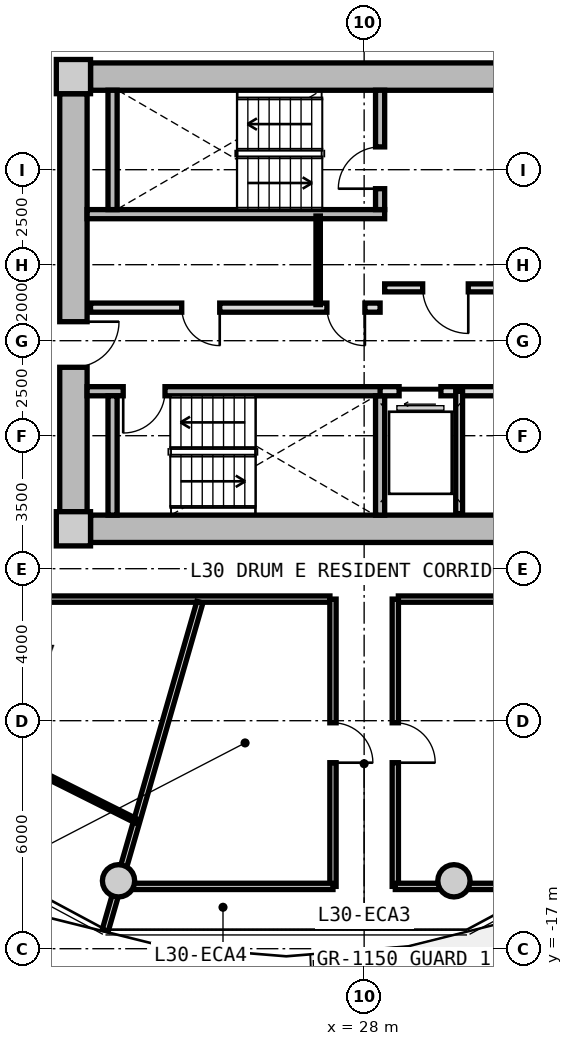
"""IFC4 building model, lengths in metres.
Left out: names, types, materials, properties, quantities, classifications, styles, units other than length and angle.
Written with IfcOpenShell. Run it as: python <this file> out.ifc"""

import sys

from ifc_helpers import new_model, si_unit, direction, frame, frame_2d, origin, origin_2d, place, context, subcontext, project, spatial, rectangle, circle, extrude, source, transform, mapped, element, fill, save


model = new_model("IFC4")
c1 = context("Model", 3, precision=1e-05, world=origin(), true_north=direction((0.0, 1.0)))
c2 = subcontext(c1, "Body", "Model", "MODEL_VIEW")
j1 = project(units=[si_unit("LENGTHUNIT", "METRE"), si_unit("PLANEANGLEUNIT", "RADIAN")], contexts=[c1])
p1 = place(None, origin())
s1 = spatial("IfcSite", under=j1, at=p1, CompositionType="ELEMENT")
p2 = place(p1, origin())
s2 = spatial("IfcBuilding", under=s1, at=p2, CompositionType="ELEMENT")
p3 = place(p2, frame((0.0, 0.0, 99.3)))
s3 = spatial("IfcBuildingStorey", under=s2, at=p3, CompositionType="ELEMENT", Elevation=99.3)
m1 = source(origin(), c2, "Body", "SweptSolid", [
    extrude(rectangle(XDim=0.9, YDim=0.9, at=origin_2d()), origin(), (0.0, 0.0, 1.0), 3.05),
])
for number, where, z_axis, x_axis in (
    (1, (20.35, -5.95, 0.0), (0.0, 0.0, 1.0), (1.0, 0.0, 0.0)),
    (2, (20.35, 5.95, 0.0), (0.0, 0.0, 1.0), (1.0, 0.0, 0.0)),
):
    element("IfcColumn", number, at=place(p3, frame(where, z_axis=z_axis, x_axis=x_axis)), inside=s3, PredefinedType="COLUMN", context=c2, shape_type="MappedRepresentation", body=[
        mapped(m1, transform((0.0, 0.0, 0.0), x_axis=(1.0, 0.0, 0.0), y_axis=(0.0, 1.0, 0.0), z_axis=(0.0, 0.0, 1.0), scale=1.0)),
    ])
m2 = source(origin(), c2, "Body", "SweptSolid", [
    extrude(rectangle(XDim=14.4, YDim=0.72, at=frame_2d((7.2, 0.0))), origin(), (0.0, 0.0, 1.0), 2.79),
])
for number, where, z_axis, x_axis in (
    (3, (20.8, 5.95, 0.0), (0.0, 0.0, 1.0), (1.0, 0.0, 0.0)),
    (4, (35.2, -5.95, 0.0), (0.0, 0.0, 1.0), (-1.0, 0.0, 0.0)),
):
    element("IfcWall", number, at=place(p3, frame(where, z_axis=z_axis, x_axis=x_axis)), inside=s3, PredefinedType="SHEAR", context=c2, shape_type="MappedRepresentation", body=[
        mapped(m2, transform((0.0, 0.0, 0.0), x_axis=(1.0, 0.0, 0.0), y_axis=(0.0, 1.0, 0.0), z_axis=(0.0, 0.0, 1.0), scale=1.0)),
    ])
m3 = source(origin(), c2, "Body", "SweptSolid", [
    extrude(rectangle(XDim=11.0, YDim=0.72, at=frame_2d((5.5, 0.0))), origin(), (0.0, 0.0, 1.0), 2.79),
])
p4 = place(p3, frame((20.35, -5.5, 0.0), z_axis=(0.0, 0.0, 1.0), x_axis=(0.0, 1.0, 0.0)))
e5 = element("IfcWall", 5, at=p4, inside=s3, PredefinedType="SHEAR", context=c2, shape_type="MappedRepresentation", body=[
    mapped(m3, transform((0.0, 0.0, 0.0), x_axis=(1.0, 0.0, 0.0), y_axis=(0.0, 1.0, 0.0), z_axis=(0.0, 0.0, 1.0), scale=1.0)),
])
p5 = place(p4, frame((3.8, 0.0, 0.0)))
e6 = element("IfcOpeningElement", 6, at=p5, cuts=e5, PredefinedType="OPENING", context=c2, shape_type="SweptSolid", body=[
    extrude(rectangle(XDim=1.2, YDim=2.15, at=frame_2d((0.6, 1.075))), frame((0.0, 0.37, 0.0), z_axis=(0.0, -1.0, 0.0), x_axis=(1.0, 0.0, 0.0)), (0.0, 0.0, 1.0), 0.74),
])
m4 = source(origin(), c2, "Body", "SweptSolid", [
    extrude(circle(Radius=0.425, at=origin_2d()), origin(), (0.0, 0.0, 1.0), 3.05),
])
for number, where, z_axis, x_axis in (
    (7, (21.537, -15.213, 0.0), (0.0, 0.0, 1.0), (1.0, 0.0, 0.0)),
    (8, (30.363, -15.213, 0.0), (0.0, 0.0, 1.0), (1.0, 0.0, 0.0)),
):
    element("IfcColumn", number, at=place(p3, frame(where, z_axis=z_axis, x_axis=x_axis)), inside=s3, PredefinedType="COLUMN", context=c2, shape_type="MappedRepresentation", body=[
        mapped(m4, transform((0.0, 0.0, 0.0), x_axis=(1.0, 0.0, 0.0), y_axis=(0.0, 1.0, 0.0), z_axis=(0.0, 0.0, 1.0), scale=1.0)),
    ])
m5 = source(origin(), c2, "Body", "SweptSolid", [
    extrude(rectangle(XDim=7.83, YDim=0.24, at=frame_2d((3.915, 0.0))), origin(), (0.0, 0.0, 1.0), 2.79),
])
p6 = place(p3, frame((20.71, 2.33, 0.0), z_axis=(0.0, 0.0, 1.0), x_axis=(1.0, 0.0, 0.0)))
e9 = element("IfcWall", 9, at=p6, inside=s3, PredefinedType="PARTITIONING", context=c2, shape_type="MappedRepresentation", body=[
    mapped(m5, transform((0.0, 0.0, 0.0), x_axis=(1.0, 0.0, 0.0), y_axis=(0.0, 1.0, 0.0), z_axis=(0.0, 0.0, 1.0), scale=1.0)),
])
m6 = source(origin(), c2, "Body", "SweptSolid", [
    extrude(rectangle(XDim=3.14, YDim=0.24, at=frame_2d((1.57, 0.0))), origin(), (0.0, 0.0, 1.0), 2.79),
])
p7 = place(p3, frame((21.38, 2.45, 0.0), z_axis=(0.0, 0.0, 1.0), x_axis=(0.0, 1.0, 0.0)))
e10 = element("IfcWall", 10, at=p7, inside=s3, PredefinedType="PARTITIONING", context=c2, shape_type="MappedRepresentation", body=[
    mapped(m6, transform((0.0, 0.0, 0.0), x_axis=(1.0, 0.0, 0.0), y_axis=(0.0, 1.0, 0.0), z_axis=(0.0, 0.0, 1.0), scale=1.0)),
])
p8 = place(p3, frame((28.42, 2.45, 0.0), z_axis=(0.0, 0.0, 1.0), x_axis=(0.0, 1.0, 0.0)))
e11 = element("IfcWall", 11, at=p8, inside=s3, PredefinedType="PARTITIONING", context=c2, shape_type="MappedRepresentation", body=[
    mapped(m6, transform((0.0, 0.0, 0.0), x_axis=(1.0, 0.0, 0.0), y_axis=(0.0, 1.0, 0.0), z_axis=(0.0, 0.0, 1.0), scale=1.0)),
])
p9 = place(p8, frame((0.55, 0.0, 0.0)))
e12 = element("IfcOpeningElement", 12, at=p9, cuts=e11, PredefinedType="OPENING", context=c2, shape_type="SweptSolid", body=[
    extrude(rectangle(XDim=1.1, YDim=2.15, at=frame_2d((0.55, 1.075))), frame((0.0, 0.13, 0.0), z_axis=(0.0, -1.0, 0.0), x_axis=(1.0, 0.0, 0.0)), (0.0, 0.0, 1.0), 0.26),
])
p10 = place(p3, frame((20.71, -2.33, 0.0), z_axis=(0.0, 0.0, 1.0), x_axis=(1.0, 0.0, 0.0)))
e13 = element("IfcWall", 13, at=p10, inside=s3, PredefinedType="PARTITIONING", context=c2, shape_type="MappedRepresentation", body=[
    mapped(m5, transform((0.0, 0.0, 0.0), x_axis=(1.0, 0.0, 0.0), y_axis=(0.0, 1.0, 0.0), z_axis=(0.0, 0.0, 1.0), scale=1.0)),
])
p11 = place(p10, frame((0.95, 0.0, 0.0)))
e14 = element("IfcOpeningElement", 14, at=p11, cuts=e13, PredefinedType="OPENING", context=c2, shape_type="SweptSolid", body=[
    extrude(rectangle(XDim=1.1, YDim=2.15, at=frame_2d((0.55, 1.075))), frame((0.0, 0.13, 0.0), z_axis=(0.0, -1.0, 0.0), x_axis=(1.0, 0.0, 0.0)), (0.0, 0.0, 1.0), 0.26),
])
for number, where, z_axis, x_axis in (
    (15, (21.38, -5.59, 0.0), (0.0, 0.0, 1.0), (0.0, 1.0, 0.0)),
    (16, (28.42, -5.59, 0.0), (0.0, 0.0, 1.0), (0.0, 1.0, 0.0)),
):
    element("IfcWall", number, at=place(p3, frame(where, z_axis=z_axis, x_axis=x_axis)), inside=s3, PredefinedType="PARTITIONING", context=c2, shape_type="MappedRepresentation", body=[
        mapped(m6, transform((0.0, 0.0, 0.0), x_axis=(1.0, 0.0, 0.0), y_axis=(0.0, 1.0, 0.0), z_axis=(0.0, 0.0, 1.0), scale=1.0)),
    ])
m7 = source(origin(), c2, "Body", "SweptSolid", [
    extrude(rectangle(XDim=6.66, YDim=0.21, at=frame_2d((3.33, 0.0))), origin(), (0.0, 0.0, 1.0), 2.775),
])
p12 = place(p3, frame((28.54, 0.39, 0.0), z_axis=(0.0, 0.0, 1.0), x_axis=(1.0, 0.0, 0.0)))
e17 = element("IfcWall", 17, at=p12, inside=s3, PredefinedType="PARTITIONING", context=c2, shape_type="MappedRepresentation", body=[
    mapped(m7, transform((0.0, 0.0, 0.0), x_axis=(1.0, 0.0, 0.0), y_axis=(0.0, 1.0, 0.0), z_axis=(0.0, 0.0, 1.0), scale=1.0)),
])
p13 = place(p12, frame((1.0, 0.0, 0.0)))
e18 = element("IfcOpeningElement", 18, at=p13, cuts=e17, PredefinedType="OPENING", context=c2, shape_type="SweptSolid", body=[
    extrude(rectangle(XDim=1.2, YDim=2.15, at=frame_2d((0.6, 1.075))), frame((0.0, 0.115, 0.0), z_axis=(0.0, -1.0, 0.0), x_axis=(1.0, 0.0, 0.0)), (0.0, 0.0, 1.0), 0.23),
])
m8 = source(origin(), c2, "Body", "SweptSolid", [
    extrude(rectangle(XDim=7.62, YDim=0.24, at=frame_2d((3.81, 0.0))), origin(), (0.0, 0.0, 1.0), 2.775),
])
p14 = place(p3, frame((20.8, -0.13, 0.0), z_axis=(0.0, 0.0, 1.0), x_axis=(1.0, 0.0, 0.0)))
e19 = element("IfcWall", 19, at=p14, inside=s3, PredefinedType="PARTITIONING", context=c2, shape_type="MappedRepresentation", body=[
    mapped(m8, transform((0.0, 0.0, 0.0), x_axis=(1.0, 0.0, 0.0), y_axis=(0.0, 1.0, 0.0), z_axis=(0.0, 0.0, 1.0), scale=1.0)),
])
p15 = place(p14, frame((6.22, 0.0, 0.0)))
e20 = element("IfcOpeningElement", 20, at=p15, cuts=e19, PredefinedType="OPENING", context=c2, shape_type="SweptSolid", body=[
    extrude(rectangle(XDim=1.0, YDim=2.1, at=frame_2d((0.5, 1.05))), frame((0.0, 0.13, 0.0), z_axis=(0.0, -1.0, 0.0), x_axis=(1.0, 0.0, 0.0)), (0.0, 0.0, 1.0), 0.26),
])
p16 = place(p14, frame((2.4, 0.0, 0.0)))
e21 = element("IfcOpeningElement", 21, at=p16, cuts=e19, PredefinedType="OPENING", context=c2, shape_type="SweptSolid", body=[
    extrude(rectangle(XDim=1.0, YDim=2.1, at=frame_2d((0.5, 1.05))), frame((0.0, 0.13, 0.0), z_axis=(0.0, -1.0, 0.0), x_axis=(1.0, 0.0, 0.0)), (0.0, 0.0, 1.0), 0.26),
])
m9 = source(origin(), c2, "Body", "SweptSolid", [
    extrude(rectangle(XDim=2.33, YDim=0.115, at=frame_2d((1.165, 0.0))), origin(), (0.0, 0.0, 1.0), 2.775),
])
p17 = place(p3, frame((26.79, -0.05, 0.0), z_axis=(0.0, 0.0, 1.0), x_axis=(0.0, 1.0, 0.0)))
e22 = element("IfcWall", 22, at=p17, inside=s3, PredefinedType="PARTITIONING", context=c2, shape_type="MappedRepresentation", body=[
    mapped(m9, transform((0.0, 0.0, 0.0), x_axis=(1.0, 0.0, 0.0), y_axis=(0.0, 1.0, 0.0), z_axis=(0.0, 0.0, 1.0), scale=1.0)),
])
m10 = source(origin(), c2, "Body", "SweptSolid", [
    extrude(rectangle(XDim=4.13, YDim=0.24, at=frame_2d((2.065, 0.0))), origin(), (0.0, 0.0, 1.0), 2.775),
])
p18 = place(p3, frame((28.42, -2.33, 0.0), z_axis=(0.0, 0.0, 1.0), x_axis=(1.0, 0.0, 0.0)))
e23 = element("IfcWall", 23, at=p18, inside=s3, PredefinedType="PARTITIONING", context=c2, shape_type="MappedRepresentation", body=[
    mapped(m10, transform((0.0, 0.0, 0.0), x_axis=(1.0, 0.0, 0.0), y_axis=(0.0, 1.0, 0.0), z_axis=(0.0, 0.0, 1.0), scale=1.0)),
])
p19 = place(p18, frame((0.5, 0.0, 0.0)))
e24 = element("IfcOpeningElement", 24, at=p19, cuts=e23, PredefinedType="OPENING", context=c2, shape_type="SweptSolid", body=[
    extrude(rectangle(XDim=1.1, YDim=2.2, at=frame_2d((0.55, 1.1))), frame((0.0, 0.13, 0.0), z_axis=(0.0, -1.0, 0.0), x_axis=(1.0, 0.0, 0.0)), (0.0, 0.0, 1.0), 0.26),
])
m11 = source(origin(), c2, "Body", "SweptSolid", [
    extrude(rectangle(XDim=3.22, YDim=0.18, at=frame_2d((1.61, 0.0))), origin(), (0.0, 0.0, 1.0), 2.775),
])
p20 = place(p3, frame((30.5, -5.55, 0.0), z_axis=(0.0, 0.0, 1.0), x_axis=(0.0, 1.0, 0.0)))
e25 = element("IfcWall", 25, at=p20, inside=s3, PredefinedType="PARTITIONING", context=c2, shape_type="MappedRepresentation", body=[
    mapped(m11, transform((0.0, 0.0, 0.0), x_axis=(1.0, 0.0, 0.0), y_axis=(0.0, 1.0, 0.0), z_axis=(0.0, 0.0, 1.0), scale=1.0)),
])
m12 = source(origin(), c2, "Body", "SweptSolid", [
    extrude(rectangle(XDim=8.6, YDim=0.165, at=frame_2d((4.3, 0.0))), origin(), (0.0, 0.0, 1.0), 2.775),
])
for number, where, z_axis, x_axis in (
    (26, (37.5, -7.8, 0.0), (0.0, 0.0, 1.0), (-1.0, 0.0, 0.0)),
    (27, (27.1, -7.8, 0.0), (0.0, 0.0, 1.0), (-1.0, 0.0, 0.0)),
):
    element("IfcWall", number, at=place(p3, frame(where, z_axis=z_axis, x_axis=x_axis)), inside=s3, PredefinedType="PARTITIONING", context=c2, shape_type="MappedRepresentation", body=[
        mapped(m12, transform((0.0, 0.0, 0.0), x_axis=(1.0, 0.0, 0.0), y_axis=(0.0, 1.0, 0.0), z_axis=(0.0, 0.0, 1.0), scale=1.0)),
    ])
m13 = source(origin(), c2, "Body", "SweptSolid", [
    extrude(rectangle(XDim=8.989, YDim=0.165, at=frame_2d((4.495, 0.0))), origin(), (0.0, 0.0, 1.0), 2.275),
])
p21 = place(p3, frame((23.678, -7.88, 0.0), z_axis=(0.0, 0.0, 1.0), x_axis=(-0.27702323008, -0.960863221274, 0.0)))
e28 = element("IfcWall", 28, at=p21, inside=s3, PredefinedType="PARTITIONING", context=c2, shape_type="MappedRepresentation", body=[
    mapped(m13, transform((0.0, 0.0, 0.0), x_axis=(1.0, 0.0, 0.0), y_axis=(0.0, 1.0, 0.0), z_axis=(0.0, 0.0, 1.0), scale=1.0)),
])
m14 = source(origin(), c2, "Body", "SweptSolid", [
    extrude(rectangle(XDim=7.56, YDim=0.165, at=frame_2d((3.78, 0.0))), origin(), (0.0, 0.0, 1.0), 2.775),
])
p22 = place(p3, frame((27.18, -15.36, 0.0), z_axis=(0.0, 0.0, 1.0), x_axis=(0.0, 1.0, 0.0)))
e29 = element("IfcWall", 29, at=p22, inside=s3, PredefinedType="PARTITIONING", context=c2, shape_type="MappedRepresentation", body=[
    mapped(m14, transform((0.0, 0.0, 0.0), x_axis=(1.0, 0.0, 0.0), y_axis=(0.0, 1.0, 0.0), z_axis=(0.0, 0.0, 1.0), scale=1.0)),
])
p23 = place(p22, frame((3.255, 0.0, 0.0)))
e30 = element("IfcOpeningElement", 30, at=p23, cuts=e29, PredefinedType="OPENING", context=c2, shape_type="SweptSolid", body=[
    extrude(rectangle(XDim=1.05, YDim=2.15, at=frame_2d((0.525, 1.075))), frame((0.0, 0.093, 0.0), z_axis=(0.0, -1.0, 0.0), x_axis=(1.0, 0.0, 0.0)), (0.0, 0.0, 1.0), 0.185),
])
m15 = source(origin(), c2, "Body", "SweptSolid", [
    extrude(rectangle(XDim=5.814, YDim=0.165, at=frame_2d((2.907, 0.0))), origin(), (0.0, 0.0, 1.0), 2.275),
])
p24 = place(p3, frame((21.366, -15.36, 0.0), z_axis=(0.0, 0.0, 1.0), x_axis=(1.0, 0.0, 0.0)))
e31 = element("IfcWall", 31, at=p24, inside=s3, PredefinedType="PARTITIONING", context=c2, shape_type="MappedRepresentation", body=[
    mapped(m15, transform((0.0, 0.0, 0.0), x_axis=(1.0, 0.0, 0.0), y_axis=(0.0, 1.0, 0.0), z_axis=(0.0, 0.0, 1.0), scale=1.0)),
])
p25 = place(p3, frame((28.82, -15.36, 0.0), z_axis=(0.0, 0.0, 1.0), x_axis=(0.0, 1.0, 0.0)))
e32 = element("IfcWall", 32, at=p25, inside=s3, PredefinedType="PARTITIONING", context=c2, shape_type="MappedRepresentation", body=[
    mapped(m14, transform((0.0, 0.0, 0.0), x_axis=(1.0, 0.0, 0.0), y_axis=(0.0, 1.0, 0.0), z_axis=(0.0, 0.0, 1.0), scale=1.0)),
])
p26 = place(p25, frame((3.255, 0.0, 0.0)))
e33 = element("IfcOpeningElement", 33, at=p26, cuts=e32, PredefinedType="OPENING", context=c2, shape_type="SweptSolid", body=[
    extrude(rectangle(XDim=1.05, YDim=2.15, at=frame_2d((0.525, 1.075))), frame((0.0, 0.093, 0.0), z_axis=(0.0, -1.0, 0.0), x_axis=(1.0, 0.0, 0.0)), (0.0, 0.0, 1.0), 0.185),
])
m16 = source(origin(), c2, "Body", "SweptSolid", [
    extrude(rectangle(XDim=4.307, YDim=0.165, at=frame_2d((2.153, 0.0))), origin(), (0.0, 0.0, 1.0), 2.275),
])
p27 = place(p3, frame((28.82, -15.36, 0.0), z_axis=(0.0, 0.0, 1.0), x_axis=(1.0, 0.0, 0.0)))
e34 = element("IfcWall", 34, at=p27, inside=s3, PredefinedType="PARTITIONING", context=c2, shape_type="MappedRepresentation", body=[
    mapped(m16, transform((0.0, 0.0, 0.0), x_axis=(1.0, 0.0, 0.0), y_axis=(0.0, 1.0, 0.0), z_axis=(0.0, 0.0, 1.0), scale=1.0)),
])
m17 = source(origin(), c2, "Body", "SweptSolid", [
    extrude(rectangle(XDim=7.767, YDim=0.115, at=frame_2d((3.884, 0.0))), origin(), (0.0, 0.0, 1.0), 2.775),
])
p28 = place(p3, frame((15.07, -10.167, 0.0), z_axis=(0.0, 0.0, 1.0), x_axis=(0.894188177352, -0.447691303783, 0.0)))
e35 = element("IfcWall", 35, at=p28, inside=s3, PredefinedType="PARTITIONING", context=c2, shape_type="MappedRepresentation", body=[
    mapped(m17, transform((0.0, 0.0, 0.0), x_axis=(1.0, 0.0, 0.0), y_axis=(0.0, 1.0, 0.0), z_axis=(0.0, 0.0, 1.0), scale=1.0)),
])
p29 = place(p28, frame((3.409, 0.0, 0.0)))
e36 = element("IfcOpeningElement", 36, at=p29, cuts=e35, PredefinedType="OPENING", context=c2, shape_type="SweptSolid", body=[
    extrude(rectangle(XDim=0.95, YDim=2.1, at=frame_2d((0.475, 1.05))), frame((0.0, 0.067, 0.0), z_axis=(0.0, -1.0, 0.0), x_axis=(1.0, 0.0, 0.0)), (0.0, 0.0, 1.0), 0.135),
])
m18 = source(origin(), c2, "Body", "SweptSolid", [
    extrude(rectangle(XDim=1.1, YDim=2.15, at=frame_2d((0.55, 1.075))), frame((0.0, 0.025, 0.0), z_axis=(0.0, -1.0, 0.0), x_axis=(1.0, 0.0, 0.0)), (0.0, 0.0, 1.0), 0.05),
])
p30 = place(p9, origin())
e37 = element("IfcDoor", 37, at=p30, inside=s3, OperationType="SINGLE_SWING_LEFT", PredefinedType="DOOR", context=c2, shape_type="MappedRepresentation", body=[
    mapped(m18, transform((0.0, 0.0, 0.0), x_axis=(1.0, 0.0, 0.0), y_axis=(0.0, 1.0, 0.0), z_axis=(0.0, 0.0, 1.0), scale=1.0)),
])
fill(e12, e37)
p31 = place(p11, frame((1.1, 0.0, 0.0), z_axis=(0.0, 0.0, 1.0), x_axis=(-1.0, 0.0, 0.0)))
e38 = element("IfcDoor", 38, at=p31, inside=s3, OperationType="SINGLE_SWING_RIGHT", PredefinedType="DOOR", context=c2, shape_type="MappedRepresentation", body=[
    mapped(m18, transform((0.0, 0.0, 0.0), x_axis=(1.0, 0.0, 0.0), y_axis=(0.0, 1.0, 0.0), z_axis=(0.0, 0.0, 1.0), scale=1.0)),
])
fill(e14, e38)
m19 = source(origin(), c2, "Body", "SweptSolid", [
    extrude(rectangle(XDim=1.2, YDim=2.15, at=frame_2d((0.6, 1.075))), frame((0.0, 0.025, 0.0), z_axis=(0.0, -1.0, 0.0), x_axis=(1.0, 0.0, 0.0)), (0.0, 0.0, 1.0), 0.05),
])
p32 = place(p13, frame((1.2, 0.0, 0.0), z_axis=(0.0, 0.0, 1.0), x_axis=(-1.0, 0.0, 0.0)))
e39 = element("IfcDoor", 39, at=p32, inside=s3, OperationType="SINGLE_SWING_LEFT", PredefinedType="DOOR", context=c2, shape_type="MappedRepresentation", body=[
    mapped(m19, transform((0.0, 0.0, 0.0), x_axis=(1.0, 0.0, 0.0), y_axis=(0.0, 1.0, 0.0), z_axis=(0.0, 0.0, 1.0), scale=1.0)),
])
fill(e18, e39)
p33 = place(p5, frame((1.2, 0.0, 0.0), z_axis=(0.0, 0.0, 1.0), x_axis=(-1.0, 0.0, 0.0)))
e40 = element("IfcDoor", 40, at=p33, inside=s3, OperationType="SINGLE_SWING_LEFT", PredefinedType="DOOR", context=c2, shape_type="MappedRepresentation", body=[
    mapped(m19, transform((0.0, 0.0, 0.0), x_axis=(1.0, 0.0, 0.0), y_axis=(0.0, 1.0, 0.0), z_axis=(0.0, 0.0, 1.0), scale=1.0)),
])
fill(e6, e40)
m20 = source(origin(), c2, "Body", "SweptSolid", [
    extrude(rectangle(XDim=1.0, YDim=2.1, at=frame_2d((0.5, 1.05))), frame((0.0, 0.025, 0.0), z_axis=(0.0, -1.0, 0.0), x_axis=(1.0, 0.0, 0.0)), (0.0, 0.0, 1.0), 0.05),
])
p34 = place(p15, frame((1.0, 0.0, 0.0), z_axis=(0.0, 0.0, 1.0), x_axis=(-1.0, 0.0, 0.0)))
e41 = element("IfcDoor", 41, at=p34, inside=s3, OperationType="SINGLE_SWING_LEFT", PredefinedType="DOOR", context=c2, shape_type="MappedRepresentation", body=[
    mapped(m20, transform((0.0, 0.0, 0.0), x_axis=(1.0, 0.0, 0.0), y_axis=(0.0, 1.0, 0.0), z_axis=(0.0, 0.0, 1.0), scale=1.0)),
])
fill(e20, e41)
p35 = place(p16, frame((1.0, 0.0, 0.0), z_axis=(0.0, 0.0, 1.0), x_axis=(-1.0, 0.0, 0.0)))
e42 = element("IfcDoor", 42, at=p35, inside=s3, OperationType="SINGLE_SWING_LEFT", PredefinedType="DOOR", context=c2, shape_type="MappedRepresentation", body=[
    mapped(m20, transform((0.0, 0.0, 0.0), x_axis=(1.0, 0.0, 0.0), y_axis=(0.0, 1.0, 0.0), z_axis=(0.0, 0.0, 1.0), scale=1.0)),
])
fill(e21, e42)
m21 = source(origin(), c2, "Body", "SweptSolid", [
    extrude(rectangle(XDim=1.1, YDim=2.2, at=frame_2d((0.55, 1.1))), frame((0.0, 0.025, 0.0), z_axis=(0.0, -1.0, 0.0), x_axis=(1.0, 0.0, 0.0)), (0.0, 0.0, 1.0), 0.05),
])
p36 = place(p19, frame((1.1, 0.0, 0.0), z_axis=(0.0, 0.0, 1.0), x_axis=(-1.0, 0.0, 0.0)))
e43 = element("IfcDoor", 43, at=p36, inside=s3, OperationType="SLIDING_TO_LEFT", PredefinedType="DOOR", context=c2, shape_type="MappedRepresentation", body=[
    mapped(m21, transform((0.0, 0.0, 0.0), x_axis=(1.0, 0.0, 0.0), y_axis=(0.0, 1.0, 0.0), z_axis=(0.0, 0.0, 1.0), scale=1.0)),
])
fill(e24, e43)
m22 = source(origin(), c2, "Body", "SweptSolid", [
    extrude(rectangle(XDim=1.05, YDim=2.15, at=frame_2d((0.525, 1.075))), frame((0.0, 0.025, 0.0), z_axis=(0.0, -1.0, 0.0), x_axis=(1.0, 0.0, 0.0)), (0.0, 0.0, 1.0), 0.05),
])
p37 = place(p23, frame((1.05, 0.0, 0.0), z_axis=(0.0, 0.0, 1.0), x_axis=(-1.0, 0.0, 0.0)))
e44 = element("IfcDoor", 44, at=p37, inside=s3, OperationType="SINGLE_SWING_RIGHT", PredefinedType="DOOR", context=c2, shape_type="MappedRepresentation", body=[
    mapped(m22, transform((0.0, 0.0, 0.0), x_axis=(1.0, 0.0, 0.0), y_axis=(0.0, 1.0, 0.0), z_axis=(0.0, 0.0, 1.0), scale=1.0)),
])
fill(e30, e44)
p38 = place(p26, frame((1.05, 0.0, 0.0), z_axis=(0.0, 0.0, 1.0), x_axis=(-1.0, 0.0, 0.0)))
e45 = element("IfcDoor", 45, at=p38, inside=s3, OperationType="SINGLE_SWING_RIGHT", PredefinedType="DOOR", context=c2, shape_type="MappedRepresentation", body=[
    mapped(m22, transform((0.0, 0.0, 0.0), x_axis=(1.0, 0.0, 0.0), y_axis=(0.0, 1.0, 0.0), z_axis=(0.0, 0.0, 1.0), scale=1.0)),
])
fill(e33, e45)
save(model, sys.argv[1])
